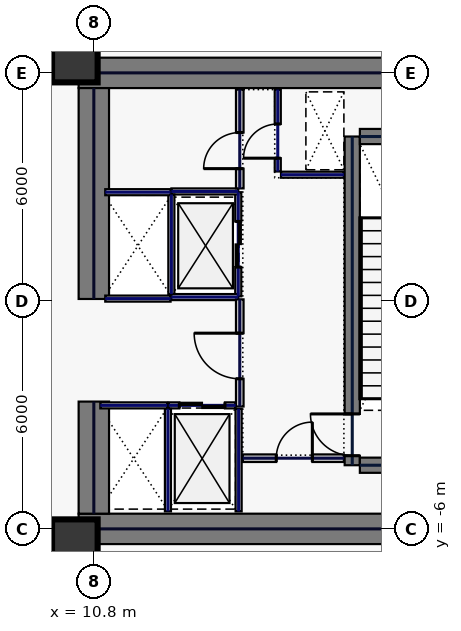
"""IFC4 building model, lengths in metres.
Left out: names, types, materials, properties, quantities, classifications, styles, units other than length and angle.
Written with IfcOpenShell. Run it as: python <this file> out.ifc"""

import sys

from ifc_helpers import new_model, si_unit, direction, frame, frame_2d, origin, origin_2d, place, context, subcontext, project, spatial, rectangle, hollow_rectangle, extrude, element, fill, save


model = new_model("IFC4")
c1 = context("Model", 3, precision=1e-05, world=origin(), true_north=direction((0.0, 1.0)))
c2 = subcontext(c1, "Body", "Model", "MODEL_VIEW")
j1 = project(units=[si_unit("LENGTHUNIT", "METRE"), si_unit("PLANEANGLEUNIT", "RADIAN")], contexts=[c1])
p1 = place(None, origin())
s1 = spatial("IfcSite", under=j1, at=p1, CompositionType="ELEMENT")
p2 = place(p1, origin())
s2 = spatial("IfcBuilding", under=s1, at=p2, CompositionType="ELEMENT")
p3 = place(p2, frame((0.0, 0.0, 13.4)))
s3 = spatial("IfcBuildingStorey", under=s2, at=p3, CompositionType="ELEMENT", Elevation=13.4)
for number, where, z_axis, x_axis in (
    (1, (10.4, 6.0, 0.0), (0.0, 0.0, 1.0), (1.0, 0.0, 0.0)),
    (2, (10.4, -6.0, 0.0), (0.0, 0.0, 1.0), (1.0, 0.0, 0.0)),
):
    element("IfcWall", number, at=place(p3, frame(where, z_axis=z_axis, x_axis=x_axis)), inside=s3, PredefinedType="SHEAR", context=c2, shape_type="SweptSolid", body=[
        extrude(rectangle(XDim=11.6, YDim=0.8, at=frame_2d((5.8, 0.0))), origin(), (0.0, 0.0, 1.0), 4.7),
    ])
p4 = place(p3, frame((10.8, -5.6, 0.0), z_axis=(0.0, 0.0, 1.0), x_axis=(0.0, 1.0, 0.0)))
e3 = element("IfcWall", 3, at=p4, inside=s3, PredefinedType="SHEAR", context=c2, shape_type="SweptSolid", body=[
    extrude(rectangle(XDim=2.95, YDim=0.8, at=frame_2d((1.475, 0.0))), origin(), (0.0, 0.0, 1.0), 4.7),
])
p5 = place(p3, frame((10.8, 0.05, 0.0), z_axis=(0.0, 0.0, 1.0), x_axis=(0.0, 1.0, 0.0)))
e4 = element("IfcWall", 4, at=p5, inside=s3, PredefinedType="SHEAR", context=c2, shape_type="SweptSolid", body=[
    extrude(rectangle(XDim=5.55, YDim=0.8, at=frame_2d((2.775, 0.0))), origin(), (0.0, 0.0, 1.0), 4.7),
])
p6 = place(p3, frame((17.6, -4.325, 0.0), z_axis=(0.0, 0.0, 1.0), x_axis=(0.0, 1.0, 0.0)))
e5 = element("IfcWall", 5, at=p6, inside=s3, PredefinedType="SHEAR", context=c2, shape_type="SweptSolid", body=[
    extrude(rectangle(XDim=8.65, YDim=0.4, at=frame_2d((4.325, 0.0))), origin(), (0.0, 0.0, 1.0), 4.7),
])
p7 = place(p6, frame((0.25, 0.0, 0.0)))
e6 = element("IfcOpeningElement", 6, at=p7, cuts=e5, PredefinedType="OPENING", context=c2, shape_type="SweptSolid", body=[
    extrude(rectangle(XDim=1.1, YDim=2.2, at=frame_2d((0.55, 1.1))), frame((0.0, 0.21, 0.0), z_axis=(0.0, -1.0, 0.0), x_axis=(1.0, 0.0, 0.0)), (0.0, 0.0, 1.0), 0.42),
])
for number, where, z_axis, x_axis in (
    (7, (17.8, -4.325, 0.0), (0.0, 0.0, 1.0), (1.0, 0.0, 0.0)),
    (8, (17.8, 4.325, 0.0), (0.0, 0.0, 1.0), (1.0, 0.0, 0.0)),
):
    element("IfcWall", number, at=place(p3, frame(where, z_axis=z_axis, x_axis=x_axis)), inside=s3, PredefinedType="SHEAR", context=c2, shape_type="SweptSolid", body=[
        extrude(rectangle(XDim=3.4, YDim=0.4, at=frame_2d((1.7, 0.0))), origin(), (0.0, 0.0, 1.0), 4.7),
    ])
for number, where, z_axis, x_axis in (
    (9, (10.3, -6.35, 0.0), (0.0, 0.0, 1.0), (1.0, 0.0, 0.0)),
    (10, (10.3, 6.35, 0.0), (0.0, 0.0, 1.0), (1.0, 0.0, 0.0)),
):
    element("IfcColumn", number, at=place(p3, frame(where, z_axis=z_axis, x_axis=x_axis)), inside=s3, PredefinedType="COLUMN", context=c2, shape_type="SweptSolid", body=[
        extrude(hollow_rectangle(XDim=1.2, YDim=1.2, WallThickness=0.05, at=origin_2d()), origin(), (0.0, 0.0, 1.0), 4.7),
    ])
p8 = place(p3, frame((14.6, 0.12, 0.0), z_axis=(0.0, 0.0, 1.0), x_axis=(0.0, 1.0, 0.0)))
e11 = element("IfcWall", 11, at=p8, inside=s3, PredefinedType="PARTITIONING", context=c2, shape_type="SweptSolid", body=[
    extrude(rectangle(XDim=2.74, YDim=0.16, at=frame_2d((1.37, 0.0))), origin(), (0.0, 0.0, 1.0), 4.7),
])
p9 = place(p8, frame((0.77, 0.0, 0.0)))
e12 = element("IfcOpeningElement", 12, at=p9, cuts=e11, PredefinedType="OPENING", context=c2, shape_type="SweptSolid", body=[
    extrude(rectangle(XDim=1.2, YDim=2.2, at=frame_2d((0.6, 1.1))), frame((0.0, 0.09, 0.0), z_axis=(0.0, -1.0, 0.0), x_axis=(1.0, 0.0, 0.0)), (0.0, 0.0, 1.0), 0.18),
])
for number, where, z_axis, x_axis in (
    (13, (12.84, 0.1, 0.0), (0.0, 0.0, 1.0), (1.0, 0.0, 0.0)),
    (14, (12.84, 2.88, 0.0), (0.0, 0.0, 1.0), (1.0, 0.0, 0.0)),
):
    element("IfcWall", number, at=place(p3, frame(where, z_axis=z_axis, x_axis=x_axis)), inside=s3, PredefinedType="PARTITIONING", context=c2, shape_type="SweptSolid", body=[
        extrude(rectangle(XDim=1.76, YDim=0.16, at=frame_2d((0.88, 0.0))), origin(), (0.0, 0.0, 1.0), 4.7),
    ])
p10 = place(p3, frame((12.84, 0.18, 0.0), z_axis=(0.0, 0.0, 1.0), x_axis=(0.0, 1.0, 0.0)))
e15 = element("IfcWall", 15, at=p10, inside=s3, PredefinedType="PARTITIONING", context=c2, shape_type="SweptSolid", body=[
    extrude(rectangle(XDim=2.62, YDim=0.16, at=frame_2d((1.31, 0.0))), origin(), (0.0, 0.0, 1.0), 4.7),
])
p11 = place(p3, frame((12.77, -2.75, 0.0), z_axis=(0.0, 0.0, 1.0), x_axis=(1.0, 0.0, 0.0)))
e16 = element("IfcWall", 16, at=p11, inside=s3, PredefinedType="PARTITIONING", context=c2, shape_type="SweptSolid", body=[
    extrude(rectangle(XDim=1.76, YDim=0.16, at=frame_2d((0.88, 0.0))), origin(), (0.0, 0.0, 1.0), 4.7),
])
p12 = place(p11, frame((0.28, 0.0, 0.0)))
e17 = element("IfcOpeningElement", 17, at=p12, cuts=e16, PredefinedType="OPENING", context=c2, shape_type="SweptSolid", body=[
    extrude(rectangle(XDim=1.2, YDim=2.2, at=frame_2d((0.6, 1.1))), frame((0.0, 0.09, 0.0), z_axis=(0.0, -1.0, 0.0), x_axis=(1.0, 0.0, 0.0)), (0.0, 0.0, 1.0), 0.18),
])
for number, where, z_axis, x_axis in (
    (18, (12.75, -5.54, 0.0), (0.0, 0.0, 1.0), (0.0, 1.0, 0.0)),
    (19, (14.61, -5.54, 0.0), (0.0, 0.0, 1.0), (0.0, 1.0, 0.0)),
):
    element("IfcWall", number, at=place(p3, frame(where, z_axis=z_axis, x_axis=x_axis)), inside=s3, PredefinedType="PARTITIONING", context=c2, shape_type="SweptSolid", body=[
        extrude(rectangle(XDim=2.7, YDim=0.16, at=frame_2d((1.35, 0.0))), origin(), (0.0, 0.0, 1.0), 4.7),
    ])
p13 = place(p3, frame((10.97, -2.75, 0.0), z_axis=(0.0, 0.0, 1.0), x_axis=(1.0, 0.0, 0.0)))
e20 = element("IfcWall", 20, at=p13, inside=s3, PredefinedType="PARTITIONING", context=c2, shape_type="SweptSolid", body=[
    extrude(rectangle(XDim=1.76, YDim=0.16, at=frame_2d((0.88, 0.0))), origin(), (0.0, 0.0, 1.0), 4.7),
])
for number, where, z_axis, x_axis in (
    (21, (11.1, 0.06, 0.0), (0.0, 0.0, 1.0), (1.0, 0.0, 0.0)),
    (22, (11.1, 2.86, 0.0), (0.0, 0.0, 1.0), (1.0, 0.0, 0.0)),
):
    element("IfcWall", number, at=place(p3, frame(where, z_axis=z_axis, x_axis=x_axis)), inside=s3, PredefinedType="PARTITIONING", context=c2, shape_type="SweptSolid", body=[
        extrude(rectangle(XDim=1.72, YDim=0.16, at=frame_2d((0.86, 0.0))), origin(), (0.0, 0.0, 1.0), 4.7),
    ])
p14 = place(p3, frame((15.64, 3.405, 0.0), z_axis=(0.0, 0.0, 1.0), x_axis=(0.0, 1.0, 0.0)))
e23 = element("IfcWall", 23, at=p14, inside=s3, PredefinedType="PARTITIONING", context=c2, shape_type="SweptSolid", body=[
    extrude(rectangle(XDim=2.155, YDim=0.16, at=frame_2d((1.078, 0.0))), origin(), (0.0, 0.0, 1.0), 4.7),
])
p15 = place(p14, frame((0.35, 0.0, 0.0)))
e24 = element("IfcOpeningElement", 24, at=p15, cuts=e23, PredefinedType="OPENING", context=c2, shape_type="SweptSolid", body=[
    extrude(rectangle(XDim=0.9, YDim=2.2, at=frame_2d((0.45, 1.1))), frame((0.0, 0.09, 0.0), z_axis=(0.0, -1.0, 0.0), x_axis=(1.0, 0.0, 0.0)), (0.0, 0.0, 1.0), 0.18),
])
p16 = place(p3, frame((15.725, 3.32, 0.0), z_axis=(0.0, 0.0, 1.0), x_axis=(1.0, 0.0, 0.0)))
e25 = element("IfcWall", 25, at=p16, inside=s3, PredefinedType="PARTITIONING", context=c2, shape_type="SweptSolid", body=[
    extrude(rectangle(XDim=1.655, YDim=0.16, at=frame_2d((0.827, 0.0))), origin(), (0.0, 0.0, 1.0), 4.7),
])
p17 = place(p3, frame((14.72, -4.14, 0.0), z_axis=(0.0, 0.0, 1.0), x_axis=(1.0, 0.0, 0.0)))
e26 = element("IfcWall", 26, at=p17, inside=s3, PredefinedType="SOLIDWALL", context=c2, shape_type="SweptSolid", body=[
    extrude(rectangle(XDim=2.66, YDim=0.2, at=frame_2d((1.33, 0.0))), origin(), (0.0, 0.0, 1.0), 4.7),
])
p18 = place(p17, frame((0.88, 0.0, 0.0)))
e27 = element("IfcOpeningElement", 27, at=p18, cuts=e26, PredefinedType="OPENING", context=c2, shape_type="SweptSolid", body=[
    extrude(rectangle(XDim=0.95, YDim=2.2, at=frame_2d((0.475, 1.1))), frame((0.0, 0.11, 0.0), z_axis=(0.0, -1.0, 0.0), x_axis=(1.0, 0.0, 0.0)), (0.0, 0.0, 1.0), 0.22),
])
p19 = place(p3, frame((14.64, 2.96, 0.0), z_axis=(0.0, 0.0, 1.0), x_axis=(0.0, 1.0, 0.0)))
e28 = element("IfcWall", 28, at=p19, inside=s3, PredefinedType="SOLIDWALL", context=c2, shape_type="SweptSolid", body=[
    extrude(rectangle(XDim=2.6, YDim=0.2, at=frame_2d((1.3, 0.0))), origin(), (0.0, 0.0, 1.0), 4.7),
])
p20 = place(p19, frame((0.52, 0.0, 0.0)))
e29 = element("IfcOpeningElement", 29, at=p20, cuts=e28, PredefinedType="OPENING", context=c2, shape_type="SweptSolid", body=[
    extrude(rectangle(XDim=0.95, YDim=2.2, at=frame_2d((0.475, 1.1))), frame((0.0, 0.11, 0.0), z_axis=(0.0, -1.0, 0.0), x_axis=(1.0, 0.0, 0.0)), (0.0, 0.0, 1.0), 0.22),
])
p21 = place(p3, frame((14.64, -2.78, 0.0), z_axis=(0.0, 0.0, 1.0), x_axis=(0.0, 1.0, 0.0)))
e30 = element("IfcWall", 30, at=p21, inside=s3, PredefinedType="SOLIDWALL", context=c2, shape_type="SweptSolid", body=[
    extrude(rectangle(XDim=2.82, YDim=0.2, at=frame_2d((1.41, 0.0))), origin(), (0.0, 0.0, 1.0), 4.7),
])
p22 = place(p21, frame((0.73, 0.0, 0.0)))
e31 = element("IfcOpeningElement", 31, at=p22, cuts=e30, PredefinedType="OPENING", context=c2, shape_type="SweptSolid", body=[
    extrude(rectangle(XDim=1.2, YDim=2.2, at=frame_2d((0.6, 1.1))), frame((0.0, 0.11, 0.0), z_axis=(0.0, -1.0, 0.0), x_axis=(1.0, 0.0, 0.0)), (0.0, 0.0, 1.0), 0.22),
])
for number, where, z_axis, x_axis in (
    (32, (10.58, 7.485, 0.0), (0.0, 0.0, 1.0), (0.0, -1.0, 0.0)),
    (33, (10.58, -6.42, 0.0), (0.0, 0.0, 1.0), (0.0, -1.0, 0.0)),
):
    element("IfcWall", number, at=place(p3, frame(where, z_axis=z_axis, x_axis=x_axis)), inside=s3, PredefinedType="PARTITIONING", context=c2, shape_type="SweptSolid", body=[
        extrude(rectangle(XDim=1.065, YDim=0.16, at=frame_2d((0.533, 0.0))), origin(), (0.0, 0.0, 1.0), 4.7),
    ])
p23 = place(p7, origin())
e34 = element("IfcDoor", 34, at=p23, inside=s3, OperationType="SINGLE_SWING_RIGHT", PredefinedType="DOOR", context=c2, shape_type="SweptSolid", body=[
    extrude(rectangle(XDim=1.1, YDim=2.2, at=frame_2d((0.55, 1.1))), frame((0.0, 0.025, 0.0), z_axis=(0.0, -1.0, 0.0), x_axis=(1.0, 0.0, 0.0)), (0.0, 0.0, 1.0), 0.05),
])
fill(e6, e34)
p24 = place(p9, origin())
e35 = element("IfcDoor", 35, at=p24, inside=s3, OperationType="SLIDING_TO_LEFT", PredefinedType="DOOR", context=c2, shape_type="SweptSolid", body=[
    extrude(rectangle(XDim=1.2, YDim=2.2, at=frame_2d((0.6, 1.1))), frame((0.0, 0.025, 0.0), z_axis=(0.0, -1.0, 0.0), x_axis=(1.0, 0.0, 0.0)), (0.0, 0.0, 1.0), 0.05),
])
fill(e12, e35)
p25 = place(p12, origin())
e36 = element("IfcDoor", 36, at=p25, inside=s3, OperationType="SLIDING_TO_LEFT", PredefinedType="DOOR", context=c2, shape_type="SweptSolid", body=[
    extrude(rectangle(XDim=1.2, YDim=2.2, at=frame_2d((0.6, 1.1))), frame((0.0, 0.025, 0.0), z_axis=(0.0, -1.0, 0.0), x_axis=(1.0, 0.0, 0.0)), (0.0, 0.0, 1.0), 0.05),
])
fill(e17, e36)
p26 = place(p15, origin())
e37 = element("IfcDoor", 37, at=p26, inside=s3, OperationType="SINGLE_SWING_LEFT", PredefinedType="DOOR", context=c2, shape_type="SweptSolid", body=[
    extrude(rectangle(XDim=0.9, YDim=2.2, at=frame_2d((0.45, 1.1))), frame((0.0, 0.025, 0.0), z_axis=(0.0, -1.0, 0.0), x_axis=(1.0, 0.0, 0.0)), (0.0, 0.0, 1.0), 0.05),
])
fill(e24, e37)
p27 = place(p18, origin())
e38 = element("IfcDoor", 38, at=p27, inside=s3, OperationType="SINGLE_SWING_RIGHT", PredefinedType="DOOR", context=c2, shape_type="SweptSolid", body=[
    extrude(rectangle(XDim=0.95, YDim=2.2, at=frame_2d((0.475, 1.1))), frame((0.0, 0.025, 0.0), z_axis=(0.0, -1.0, 0.0), x_axis=(1.0, 0.0, 0.0)), (0.0, 0.0, 1.0), 0.05),
])
fill(e27, e38)
p28 = place(p20, origin())
e39 = element("IfcDoor", 39, at=p28, inside=s3, OperationType="SINGLE_SWING_LEFT", PredefinedType="DOOR", context=c2, shape_type="SweptSolid", body=[
    extrude(rectangle(XDim=0.95, YDim=2.2, at=frame_2d((0.475, 1.1))), frame((0.0, 0.025, 0.0), z_axis=(0.0, -1.0, 0.0), x_axis=(1.0, 0.0, 0.0)), (0.0, 0.0, 1.0), 0.05),
])
fill(e29, e39)
p29 = place(p22, origin())
e40 = element("IfcDoor", 40, at=p29, inside=s3, OperationType="SINGLE_SWING_RIGHT", PredefinedType="DOOR", context=c2, shape_type="SweptSolid", body=[
    extrude(rectangle(XDim=1.2, YDim=2.2, at=frame_2d((0.6, 1.1))), frame((0.0, 0.025, 0.0), z_axis=(0.0, -1.0, 0.0), x_axis=(1.0, 0.0, 0.0)), (0.0, 0.0, 1.0), 0.05),
])
fill(e31, e40)
save(model, sys.argv[1])
